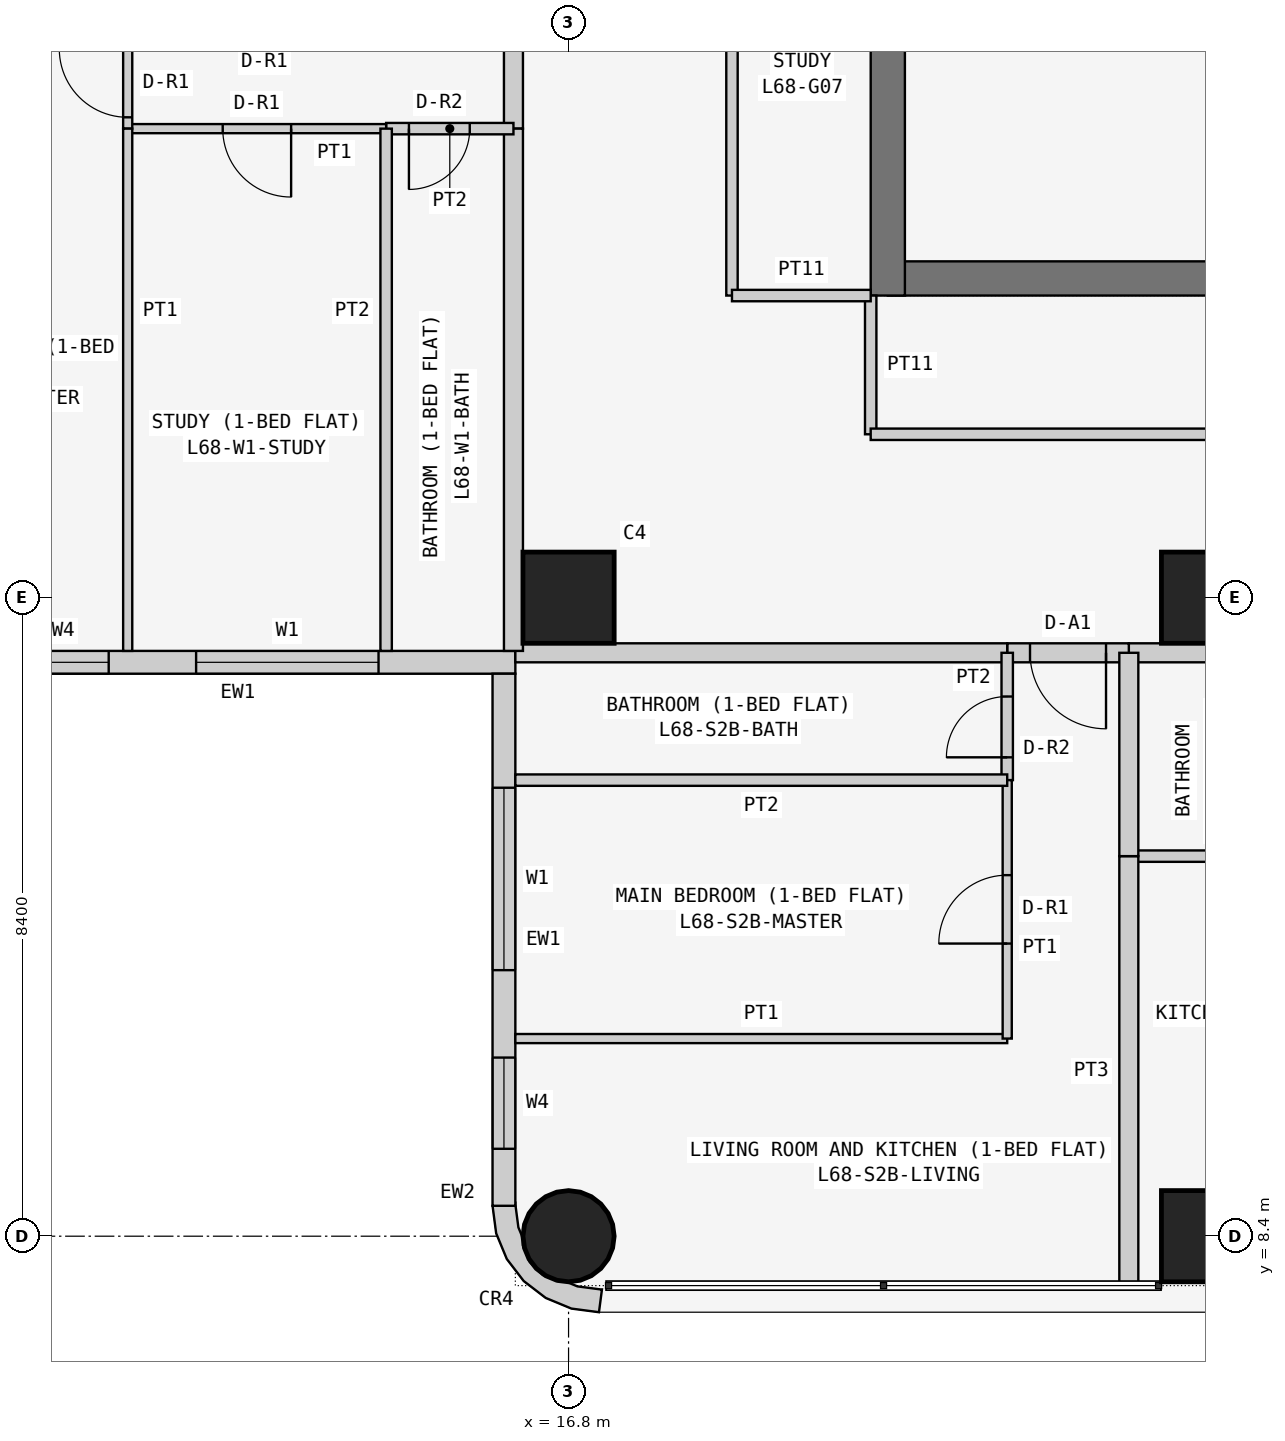
"""IFC4 building model, lengths in metres.
Left out: names, types, materials, properties, quantities, classifications, styles, units other than length and angle.
Written with IfcOpenShell. Run it as: python <this file> out.ifc"""

import sys

from ifc_helpers import new_model, si_unit, direction, frame, frame_2d, origin, origin_2d, place, context, subcontext, project, spatial, polyline, rectangle, circle, outline, extrude, element, fill, save


model = new_model("IFC4")
c1 = context("Model", 3, precision=1e-05, world=origin(), true_north=direction((0.0, 1.0)))
c2 = subcontext(c1, "Body", "Model", "MODEL_VIEW")
j1 = project(units=[si_unit("LENGTHUNIT", "METRE"), si_unit("PLANEANGLEUNIT", "RADIAN")], contexts=[c1])
p1 = place(None, origin())
s1 = spatial("IfcSite", under=j1, at=p1, CompositionType="ELEMENT")
p2 = place(p1, origin())
s2 = spatial("IfcBuilding", under=s1, at=p2, CompositionType="ELEMENT")
p3 = place(p2, frame((0.0, 0.0, 261.3)))
s3 = spatial("IfcBuildingStorey", under=s2, at=p3, CompositionType="ELEMENT", Elevation=261.3)
p4 = place(p3, frame((16.8, 8.4, 0.0), z_axis=(0.0, 0.0, 1.0), x_axis=(1.0, 0.0, 0.0)))
e1 = element("IfcColumn", 1, at=p4, inside=s3, PredefinedType="COLUMN", context=c2, shape_type="SweptSolid", body=[
    extrude(circle(Radius=0.6, at=origin_2d()), origin(), (0.0, 0.0, 1.0), 3.6),
])
for number, where, z_axis, x_axis in (
    (2, (16.8, 16.8, 0.0), (0.0, 0.0, 1.0), (1.0, 0.0, 0.0)),
    (3, (25.2, 8.4, 0.0), (0.0, 0.0, 1.0), (1.0, 0.0, 0.0)),
    (4, (25.2, 16.8, 0.0), (0.0, 0.0, 1.0), (1.0, 0.0, 0.0)),
):
    element("IfcColumn", number, at=place(p3, frame(where, z_axis=z_axis, x_axis=x_axis)), inside=s3, PredefinedType="COLUMN", context=c2, shape_type="SweptSolid", body=[
        extrude(rectangle(XDim=1.2, YDim=1.2, at=origin_2d()), origin(), (0.0, 0.0, 1.0), 3.6),
    ])
p5 = place(p3, frame((21.0, 21.0, 0.0), z_axis=(0.0, 0.0, 1.0), x_axis=(1.0, 0.0, 0.0)))
e5 = element("IfcWall", 5, at=p5, inside=s3, PredefinedType="SHEAR", context=c2, shape_type="SweptSolid", body=[
    extrude(rectangle(XDim=17.025, YDim=0.45, at=frame_2d((8.512, 0.0))), origin(), (0.0, 0.0, 1.0), 3.6),
])
p6 = place(p3, frame((21.0, 37.8, 0.0), z_axis=(0.0, 0.0, 1.0), x_axis=(0.0, -1.0, 0.0)))
e6 = element("IfcWall", 6, at=p6, inside=s3, PredefinedType="SHEAR", context=c2, shape_type="SweptSolid", body=[
    extrude(rectangle(XDim=17.025, YDim=0.45, at=frame_2d((8.513, 0.0))), origin(), (0.0, 0.0, 1.0), 3.6),
])
p7 = place(p6, frame((5.4, 0.0, 0.0)))
e7 = element("IfcOpeningElement", 7, at=p7, cuts=e6, PredefinedType="OPENING", context=c2, shape_type="SweptSolid", body=[
    extrude(rectangle(XDim=1.2, YDim=2.1, at=frame_2d((0.6, 1.05))), frame((0.0, 0.235, 0.0), z_axis=(0.0, -1.0, 0.0), x_axis=(1.0, 0.0, 0.0)), (0.0, 0.0, 1.0), 0.47),
])
p8 = place(p3, frame((8.8, 15.95, 0.0), z_axis=(0.0, 0.0, 1.0), x_axis=(1.0, 0.0, 0.0)))
e8 = element("IfcWall", 8, at=p8, inside=s3, PredefinedType="SOLIDWALL", context=c2, shape_type="SweptSolid", body=[
    extrude(rectangle(XDim=7.3, YDim=0.3, at=frame_2d((3.65, 0.0))), origin(), (0.0, 0.0, 1.0), 3.45),
])
p9 = place(p8, frame((3.1, 0.0, 0.9)))
e9 = element("IfcOpeningElement", 9, at=p9, cuts=e8, PredefinedType="OPENING", context=c2, shape_type="SweptSolid", body=[
    extrude(rectangle(XDim=2.4, YDim=1.5, at=frame_2d((1.2, 0.75))), frame((0.0, 0.16, 0.0), z_axis=(0.0, -1.0, 0.0), x_axis=(1.0, 0.0, 0.0)), (0.0, 0.0, 1.0), 0.32),
])
p10 = place(p8, frame((0.75, 0.0, 0.9)))
e10 = element("IfcOpeningElement", 10, at=p10, cuts=e8, PredefinedType="OPENING", context=c2, shape_type="SweptSolid", body=[
    extrude(rectangle(XDim=1.2, YDim=1.5, at=frame_2d((0.6, 0.75))), frame((0.0, 0.16, 0.0), z_axis=(0.0, -1.0, 0.0), x_axis=(1.0, 0.0, 0.0)), (0.0, 0.0, 1.0), 0.32),
])
p11 = place(p3, frame((15.95, 15.8, 0.0), z_axis=(0.0, 0.0, 1.0), x_axis=(0.0, -1.0, 0.0)))
e11 = element("IfcWall", 11, at=p11, inside=s3, PredefinedType="SOLIDWALL", context=c2, shape_type="SweptSolid", body=[
    extrude(rectangle(XDim=7.0, YDim=0.3, at=frame_2d((3.5, 0.0))), origin(), (0.0, 0.0, 1.0), 3.45),
])
p12 = place(p11, frame((1.5, 0.0, 0.9)))
e12 = element("IfcOpeningElement", 12, at=p12, cuts=e11, PredefinedType="OPENING", context=c2, shape_type="SweptSolid", body=[
    extrude(rectangle(XDim=2.4, YDim=1.5, at=frame_2d((1.2, 0.75))), frame((0.0, 0.16, 0.0), z_axis=(0.0, -1.0, 0.0), x_axis=(1.0, 0.0, 0.0)), (0.0, 0.0, 1.0), 0.32),
])
p13 = place(p11, frame((5.05, 0.0, 0.9)))
e13 = element("IfcOpeningElement", 13, at=p13, cuts=e11, PredefinedType="OPENING", context=c2, shape_type="SweptSolid", body=[
    extrude(rectangle(XDim=1.2, YDim=1.5, at=frame_2d((0.6, 0.75))), frame((0.0, 0.16, 0.0), z_axis=(0.0, -1.0, 0.0), x_axis=(1.0, 0.0, 0.0)), (0.0, 0.0, 1.0), 0.32),
])
p14 = place(p3, frame((16.224, 8.762, 0.0), z_axis=(0.0, 0.0, 1.0), x_axis=(-0.707106781187, -0.707106781187, 0.0)))
e14 = element("IfcWall", 14, at=p14, inside=s3, PredefinedType="SOLIDWALL", context=c2, shape_type="SweptSolid", body=[
    extrude(outline(polyline([(0.033, 1.469), (0.047, 1.455), (0.233, 1.212), (0.292, 1.069), (0.358, 1.003), (0.449, 0.783), (0.449, 0.543), (0.358, 0.322), (0.292, 0.257), (0.233, 0.114), (0.047, -0.129), (0.033, -0.143), (0.273, -0.327), (0.495, -0.037), (0.635, 0.3), (0.683, 0.663), (0.635, 1.025), (0.495, 1.363), (0.273, 1.653), (0.033, 1.469)])), origin(), (0.0, 0.0, 1.0), 3.45),
])
p15 = place(p3, frame((20.775, 20.775, 0.0), z_axis=(0.0, 0.0, 1.0), x_axis=(0.0, -1.0, 0.0)))
e15 = element("IfcWall", 15, at=p15, inside=s3, PredefinedType="PARTITIONING", context=c2, shape_type="SweptSolid", body=[
    extrude(rectangle(XDim=1.825, YDim=0.15, at=frame_2d((0.913, 0.0))), origin(), (0.0, 0.0, 1.0), 3.45),
])
p16 = place(p3, frame((20.775, 18.95, 0.0), z_axis=(0.0, 0.0, 1.0), x_axis=(1.0, 0.0, 0.0)))
e16 = element("IfcWall", 16, at=p16, inside=s3, PredefinedType="PARTITIONING", context=c2, shape_type="SweptSolid", body=[
    extrude(rectangle(XDim=11.925, YDim=0.15, at=frame_2d((5.962, 0.0))), origin(), (0.0, 0.0, 1.0), 3.45),
])
p17 = place(p16, frame((8.125, 0.0, 0.0)))
e17 = element("IfcOpeningElement", 17, at=p17, cuts=e16, PredefinedType="OPENING", context=c2, shape_type="SweptSolid", body=[
    extrude(rectangle(XDim=1.0, YDim=2.1, at=frame_2d((0.5, 1.05))), frame((0.0, 0.085, 0.0), z_axis=(0.0, -1.0, 0.0), x_axis=(1.0, 0.0, 0.0)), (0.0, 0.0, 1.0), 0.17),
])
p18 = place(p3, frame((18.95, 30.6, 0.0), z_axis=(0.0, 0.0, 1.0), x_axis=(0.0, -1.0, 0.0)))
e18 = element("IfcWall", 18, at=p18, inside=s3, PredefinedType="PARTITIONING", context=c2, shape_type="SweptSolid", body=[
    extrude(rectangle(XDim=9.825, YDim=0.15, at=frame_2d((4.913, 0.0))), origin(), (0.0, 0.0, 1.0), 3.45),
])
p19 = place(p18, frame((1.75, 0.0, 0.0)))
e19 = element("IfcOpeningElement", 19, at=p19, cuts=e18, PredefinedType="OPENING", context=c2, shape_type="SweptSolid", body=[
    extrude(rectangle(XDim=1.0, YDim=2.1, at=frame_2d((0.5, 1.05))), frame((0.0, 0.085, 0.0), z_axis=(0.0, -1.0, 0.0), x_axis=(1.0, 0.0, 0.0)), (0.0, 0.0, 1.0), 0.17),
])
p20 = place(p3, frame((18.95, 20.775, 0.0), z_axis=(0.0, 0.0, 1.0), x_axis=(1.0, 0.0, 0.0)))
e20 = element("IfcWall", 20, at=p20, inside=s3, PredefinedType="PARTITIONING", context=c2, shape_type="SweptSolid", body=[
    extrude(rectangle(XDim=1.825, YDim=0.15, at=frame_2d((0.913, 0.0))), origin(), (0.0, 0.0, 1.0), 3.45),
])
p21 = place(p3, frame((26.8, 16.075, 0.0), z_axis=(0.0, 0.0, 1.0), x_axis=(-1.0, 0.0, 0.0)))
e21 = element("IfcWall", 21, at=p21, inside=s3, PredefinedType="PARTITIONING", context=c2, shape_type="SweptSolid", body=[
    extrude(rectangle(XDim=2.629, YDim=0.25, at=frame_2d((1.314, 0.0))), origin(), (0.0, 0.0, 1.0), 3.45),
])
p22 = place(p3, frame((24.171, 16.075, 0.0), z_axis=(0.0, 0.0, 1.0), x_axis=(-1.0, 0.0, 0.0)))
e22 = element("IfcWall", 22, at=p22, inside=s3, PredefinedType="PARTITIONING", context=c2, shape_type="SweptSolid", body=[
    extrude(rectangle(XDim=1.6, YDim=0.25, at=frame_2d((0.8, 0.0))), origin(), (0.0, 0.0, 1.0), 3.45),
])
p23 = place(p22, frame((0.3, 0.0, 0.0)))
e23 = element("IfcOpeningElement", 23, at=p23, cuts=e22, PredefinedType="OPENING", context=c2, shape_type="SweptSolid", body=[
    extrude(rectangle(XDim=1.0, YDim=2.1, at=frame_2d((0.5, 1.05))), frame((0.0, 0.135, 0.0), z_axis=(0.0, -1.0, 0.0), x_axis=(1.0, 0.0, 0.0)), (0.0, 0.0, 1.0), 0.27),
])
p24 = place(p3, frame((22.571, 16.075, 0.0), z_axis=(0.0, 0.0, 1.0), x_axis=(-1.0, 0.0, 0.0)))
e24 = element("IfcWall", 24, at=p24, inside=s3, PredefinedType="PARTITIONING", context=c2, shape_type="SweptSolid", body=[
    extrude(rectangle(XDim=6.471, YDim=0.25, at=frame_2d((3.235, 0.0))), origin(), (0.0, 0.0, 1.0), 3.45),
])
p25 = place(p3, frame((16.075, 22.971, 0.0), z_axis=(0.0, 0.0, 1.0), x_axis=(0.0, 1.0, 0.0)))
e25 = element("IfcWall", 25, at=p25, inside=s3, PredefinedType="PARTITIONING", context=c2, shape_type="SweptSolid", body=[
    extrude(rectangle(XDim=6.429, YDim=0.25, at=frame_2d((3.214, 0.0))), origin(), (0.0, 0.0, 1.0), 3.45),
])
p26 = place(p25, frame((4.929, 0.0, 0.0)))
e26 = element("IfcOpeningElement", 26, at=p26, cuts=e25, PredefinedType="OPENING", context=c2, shape_type="SweptSolid", body=[
    extrude(rectangle(XDim=1.0, YDim=2.1, at=frame_2d((0.5, 1.05))), frame((0.0, 0.135, 0.0), z_axis=(0.0, -1.0, 0.0), x_axis=(1.0, 0.0, 0.0)), (0.0, 0.0, 1.0), 0.27),
])
p27 = place(p3, frame((16.075, 16.1, 0.0), z_axis=(0.0, 0.0, 1.0), x_axis=(0.0, 1.0, 0.0)))
e27 = element("IfcWall", 27, at=p27, inside=s3, PredefinedType="PARTITIONING", context=c2, shape_type="SweptSolid", body=[
    extrude(rectangle(XDim=6.871, YDim=0.25, at=frame_2d((3.436, 0.0))), origin(), (0.0, 0.0, 1.0), 3.45),
])
p28 = place(p3, frame((24.171, 13.4, 0.0), z_axis=(0.0, 0.0, 1.0), x_axis=(1.0, 0.0, 0.0)))
e28 = element("IfcWall", 28, at=p28, inside=s3, PredefinedType="PARTITIONING", context=c2, shape_type="SweptSolid", body=[
    extrude(rectangle(XDim=2.629, YDim=0.15, at=frame_2d((1.314, 0.0))), origin(), (0.0, 0.0, 1.0), 3.45),
])
p29 = place(p3, frame((24.171, 7.75, 0.0), z_axis=(0.0, 0.0, 1.0), x_axis=(0.0, 1.0, 0.0)))
e29 = element("IfcWall", 29, at=p29, inside=s3, PredefinedType="PARTITIONING", context=c2, shape_type="SweptSolid", body=[
    extrude(rectangle(XDim=5.65, YDim=0.25, at=frame_2d((2.825, 0.0))), origin(), (0.0, 0.0, 1.0), 3.45),
])
p30 = place(p3, frame((24.171, 13.4, 0.0), z_axis=(0.0, 0.0, 1.0), x_axis=(0.0, 1.0, 0.0)))
e30 = element("IfcWall", 30, at=p30, inside=s3, PredefinedType="PARTITIONING", context=c2, shape_type="SweptSolid", body=[
    extrude(rectangle(XDim=2.675, YDim=0.25, at=frame_2d((1.337, 0.0))), origin(), (0.0, 0.0, 1.0), 3.45),
])
p31 = place(p3, frame((22.571, 14.4, 0.0), z_axis=(0.0, 0.0, 1.0), x_axis=(0.0, 1.0, 0.0)))
e31 = element("IfcWall", 31, at=p31, inside=s3, PredefinedType="PARTITIONING", context=c2, shape_type="SweptSolid", body=[
    extrude(rectangle(XDim=1.675, YDim=0.15, at=frame_2d((0.837, 0.0))), origin(), (0.0, 0.0, 1.0), 3.45),
])
p32 = place(p31, frame((0.3, 0.0, 0.0)))
e32 = element("IfcOpeningElement", 32, at=p32, cuts=e31, PredefinedType="OPENING", context=c2, shape_type="SweptSolid", body=[
    extrude(rectangle(XDim=0.8, YDim=2.1, at=frame_2d((0.4, 1.05))), frame((0.0, 0.085, 0.0), z_axis=(0.0, -1.0, 0.0), x_axis=(1.0, 0.0, 0.0)), (0.0, 0.0, 1.0), 0.17),
])
p33 = place(p3, frame((16.1, 11.0, 0.0), z_axis=(0.0, 0.0, 1.0), x_axis=(1.0, 0.0, 0.0)))
e33 = element("IfcWall", 33, at=p33, inside=s3, PredefinedType="PARTITIONING", context=c2, shape_type="SweptSolid", body=[
    extrude(rectangle(XDim=6.471, YDim=0.12, at=frame_2d((3.235, 0.0))), origin(), (0.0, 0.0, 1.0), 3.45),
])
p34 = place(p3, frame((22.571, 11.0, 0.0), z_axis=(0.0, 0.0, 1.0), x_axis=(0.0, 1.0, 0.0)))
e34 = element("IfcWall", 34, at=p34, inside=s3, PredefinedType="PARTITIONING", context=c2, shape_type="SweptSolid", body=[
    extrude(rectangle(XDim=3.4, YDim=0.12, at=frame_2d((1.7, 0.0))), origin(), (0.0, 0.0, 1.0), 3.45),
])
p35 = place(p34, frame((1.25, 0.0, 0.0)))
e35 = element("IfcOpeningElement", 35, at=p35, cuts=e34, PredefinedType="OPENING", context=c2, shape_type="SweptSolid", body=[
    extrude(rectangle(XDim=0.9, YDim=2.1, at=frame_2d((0.45, 1.05))), frame((0.0, 0.07, 0.0), z_axis=(0.0, -1.0, 0.0), x_axis=(1.0, 0.0, 0.0)), (0.0, 0.0, 1.0), 0.14),
])
p36 = place(p3, frame((22.571, 14.4, 0.0), z_axis=(0.0, 0.0, 1.0), x_axis=(-1.0, 0.0, 0.0)))
e36 = element("IfcWall", 36, at=p36, inside=s3, PredefinedType="PARTITIONING", context=c2, shape_type="SweptSolid", body=[
    extrude(rectangle(XDim=6.471, YDim=0.15, at=frame_2d((3.235, 0.0))), origin(), (0.0, 0.0, 1.0), 3.45),
])
p37 = place(p3, frame((16.075, 22.971, 0.0), z_axis=(0.0, 0.0, 1.0), x_axis=(-1.0, 0.0, 0.0)))
e37 = element("IfcWall", 37, at=p37, inside=s3, PredefinedType="PARTITIONING", context=c2, shape_type="SweptSolid", body=[
    extrude(rectangle(XDim=1.675, YDim=0.15, at=frame_2d((0.837, 0.0))), origin(), (0.0, 0.0, 1.0), 3.45),
])
p38 = place(p37, frame((0.575, 0.0, 0.0)))
e38 = element("IfcOpeningElement", 38, at=p38, cuts=e37, PredefinedType="OPENING", context=c2, shape_type="SweptSolid", body=[
    extrude(rectangle(XDim=0.8, YDim=2.1, at=frame_2d((0.4, 1.05))), frame((0.0, 0.085, 0.0), z_axis=(0.0, -1.0, 0.0), x_axis=(1.0, 0.0, 0.0)), (0.0, 0.0, 1.0), 0.17),
])
p39 = place(p3, frame((14.4, 22.971, 0.0), z_axis=(0.0, 0.0, 1.0), x_axis=(-1.0, 0.0, 0.0)))
e39 = element("IfcWall", 39, at=p39, inside=s3, PredefinedType="PARTITIONING", context=c2, shape_type="SweptSolid", body=[
    extrude(rectangle(XDim=3.4, YDim=0.12, at=frame_2d((1.7, 0.0))), origin(), (0.0, 0.0, 1.0), 3.45),
])
p40 = place(p39, frame((1.25, 0.0, 0.0)))
e40 = element("IfcOpeningElement", 40, at=p40, cuts=e39, PredefinedType="OPENING", context=c2, shape_type="SweptSolid", body=[
    extrude(rectangle(XDim=0.9, YDim=2.1, at=frame_2d((0.45, 1.05))), frame((0.0, 0.07, 0.0), z_axis=(0.0, -1.0, 0.0), x_axis=(1.0, 0.0, 0.0)), (0.0, 0.0, 1.0), 0.14),
])
p41 = place(p3, frame((11.0, 22.971, 0.0), z_axis=(0.0, 0.0, 1.0), x_axis=(0.0, 1.0, 0.0)))
e41 = element("IfcWall", 41, at=p41, inside=s3, PredefinedType="PARTITIONING", context=c2, shape_type="SweptSolid", body=[
    extrude(rectangle(XDim=1.2, YDim=0.12, at=frame_2d((0.6, 0.0))), origin(), (0.0, 0.0, 1.0), 3.45),
])
p42 = place(p41, frame((0.149, 0.0, 0.0)))
e42 = element("IfcOpeningElement", 42, at=p42, cuts=e41, PredefinedType="OPENING", context=c2, shape_type="SweptSolid", body=[
    extrude(rectangle(XDim=0.9, YDim=2.1, at=frame_2d((0.45, 1.05))), frame((0.0, 0.07, 0.0), z_axis=(0.0, -1.0, 0.0), x_axis=(1.0, 0.0, 0.0)), (0.0, 0.0, 1.0), 0.14),
])
p43 = place(p3, frame((14.4, 22.971, 0.0), z_axis=(0.0, 0.0, 1.0), x_axis=(0.0, -1.0, 0.0)))
e43 = element("IfcWall", 43, at=p43, inside=s3, PredefinedType="PARTITIONING", context=c2, shape_type="SweptSolid", body=[
    extrude(rectangle(XDim=6.871, YDim=0.15, at=frame_2d((3.436, 0.0))), origin(), (0.0, 0.0, 1.0), 3.45),
])
p44 = place(p3, frame((11.0, 22.971, 0.0), z_axis=(0.0, 0.0, 1.0), x_axis=(0.0, -1.0, 0.0)))
e44 = element("IfcWall", 44, at=p44, inside=s3, PredefinedType="PARTITIONING", context=c2, shape_type="SweptSolid", body=[
    extrude(rectangle(XDim=6.871, YDim=0.12, at=frame_2d((3.436, 0.0))), origin(), (0.0, 0.0, 1.0), 3.45),
])
p45 = place(p12, origin())
e45 = element("IfcWindow", 45, at=p45, inside=s3, PartitioningType="SINGLE_PANEL", PredefinedType="WINDOW", context=c2, shape_type="SweptSolid", body=[
    extrude(rectangle(XDim=2.4, YDim=1.5, at=frame_2d((1.2, 0.75))), frame((0.0, 0.03, 0.0), z_axis=(0.0, -1.0, 0.0), x_axis=(1.0, 0.0, 0.0)), (0.0, 0.0, 1.0), 0.06),
])
fill(e12, e45)
p46 = place(p13, origin())
e46 = element("IfcWindow", 46, at=p46, inside=s3, PartitioningType="SINGLE_PANEL", PredefinedType="WINDOW", context=c2, shape_type="SweptSolid", body=[
    extrude(rectangle(XDim=1.2, YDim=1.5, at=frame_2d((0.6, 0.75))), frame((0.0, 0.03, 0.0), z_axis=(0.0, -1.0, 0.0), x_axis=(1.0, 0.0, 0.0)), (0.0, 0.0, 1.0), 0.06),
])
fill(e13, e46)
p47 = place(p9, origin())
e47 = element("IfcWindow", 47, at=p47, inside=s3, PartitioningType="SINGLE_PANEL", PredefinedType="WINDOW", context=c2, shape_type="SweptSolid", body=[
    extrude(rectangle(XDim=2.4, YDim=1.5, at=frame_2d((1.2, 0.75))), frame((0.0, 0.03, 0.0), z_axis=(0.0, -1.0, 0.0), x_axis=(1.0, 0.0, 0.0)), (0.0, 0.0, 1.0), 0.06),
])
fill(e9, e47)
p48 = place(p10, origin())
e48 = element("IfcWindow", 48, at=p48, inside=s3, PartitioningType="SINGLE_PANEL", PredefinedType="WINDOW", context=c2, shape_type="SweptSolid", body=[
    extrude(rectangle(XDim=1.2, YDim=1.5, at=frame_2d((0.6, 0.75))), frame((0.0, 0.03, 0.0), z_axis=(0.0, -1.0, 0.0), x_axis=(1.0, 0.0, 0.0)), (0.0, 0.0, 1.0), 0.06),
])
fill(e10, e48)
p49 = place(p23, origin())
e49 = element("IfcDoor", 49, at=p49, inside=s3, OperationType="SINGLE_SWING_LEFT", PredefinedType="DOOR", context=c2, shape_type="SweptSolid", body=[
    extrude(rectangle(XDim=1.0, YDim=2.1, at=frame_2d((0.5, 1.05))), frame((0.0, 0.025, 0.0), z_axis=(0.0, -1.0, 0.0), x_axis=(1.0, 0.0, 0.0)), (0.0, 0.0, 1.0), 0.05),
])
fill(e23, e49)
p50 = place(p32, origin())
e50 = element("IfcDoor", 50, at=p50, inside=s3, OperationType="SINGLE_SWING_LEFT", PredefinedType="DOOR", context=c2, shape_type="SweptSolid", body=[
    extrude(rectangle(XDim=0.8, YDim=2.1, at=frame_2d((0.4, 1.05))), frame((0.0, 0.025, 0.0), z_axis=(0.0, -1.0, 0.0), x_axis=(1.0, 0.0, 0.0)), (0.0, 0.0, 1.0), 0.05),
])
fill(e32, e50)
p51 = place(p35, origin())
e51 = element("IfcDoor", 51, at=p51, inside=s3, OperationType="SINGLE_SWING_LEFT", PredefinedType="DOOR", context=c2, shape_type="SweptSolid", body=[
    extrude(rectangle(XDim=0.9, YDim=2.1, at=frame_2d((0.45, 1.05))), frame((0.0, 0.025, 0.0), z_axis=(0.0, -1.0, 0.0), x_axis=(1.0, 0.0, 0.0)), (0.0, 0.0, 1.0), 0.05),
])
fill(e35, e51)
p52 = place(p38, origin())
e52 = element("IfcDoor", 52, at=p52, inside=s3, OperationType="SINGLE_SWING_RIGHT", PredefinedType="DOOR", context=c2, shape_type="SweptSolid", body=[
    extrude(rectangle(XDim=0.8, YDim=2.1, at=frame_2d((0.4, 1.05))), frame((0.0, 0.025, 0.0), z_axis=(0.0, -1.0, 0.0), x_axis=(1.0, 0.0, 0.0)), (0.0, 0.0, 1.0), 0.05),
])
fill(e38, e52)
p53 = place(p40, origin())
e53 = element("IfcDoor", 53, at=p53, inside=s3, OperationType="SINGLE_SWING_LEFT", PredefinedType="DOOR", context=c2, shape_type="SweptSolid", body=[
    extrude(rectangle(XDim=0.9, YDim=2.1, at=frame_2d((0.45, 1.05))), frame((0.0, 0.025, 0.0), z_axis=(0.0, -1.0, 0.0), x_axis=(1.0, 0.0, 0.0)), (0.0, 0.0, 1.0), 0.05),
])
fill(e40, e53)
p54 = place(p42, origin())
e54 = element("IfcDoor", 54, at=p54, inside=s3, OperationType="SINGLE_SWING_RIGHT", PredefinedType="DOOR", context=c2, shape_type="SweptSolid", body=[
    extrude(rectangle(XDim=0.9, YDim=2.1, at=frame_2d((0.45, 1.05))), frame((0.0, 0.025, 0.0), z_axis=(0.0, -1.0, 0.0), x_axis=(1.0, 0.0, 0.0)), (0.0, 0.0, 1.0), 0.05),
])
fill(e42, e54)
save(model, sys.argv[1])
